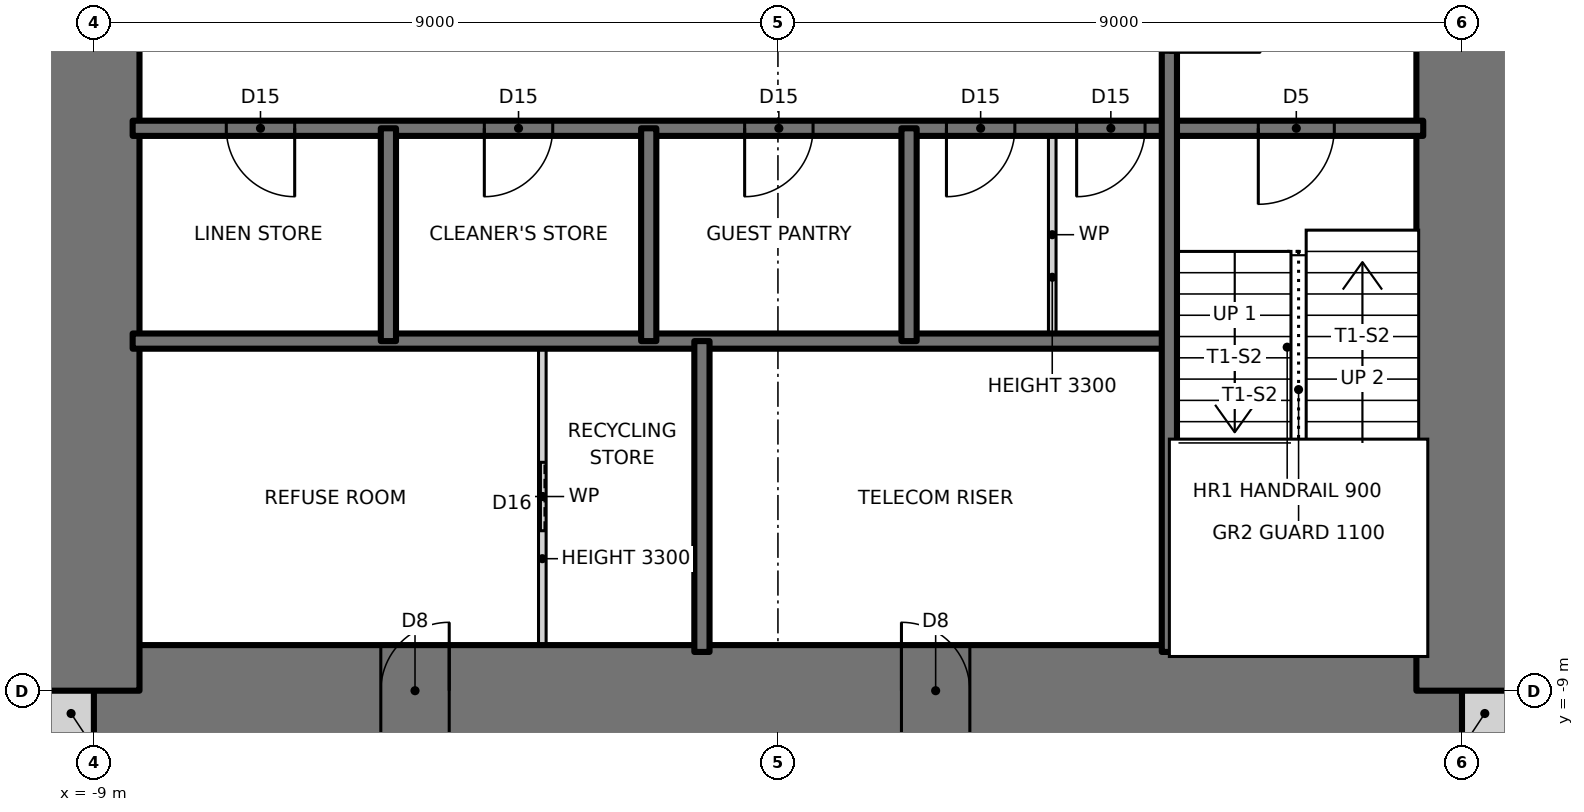
"""IFC4 building model, lengths in metres.
Left out: names, types, materials, properties, quantities, classifications, styles, units other than length and angle.
Written with IfcOpenShell. Run it as: python <this file> out.ifc"""

import sys

from ifc_helpers import new_model, si_unit, direction, frame, frame_2d, origin, place, context, subcontext, project, spatial, rectangle, extrude, element, fill, save


model = new_model("IFC4")
c1 = context("Model", 3, precision=1e-05, world=origin(), true_north=direction((0.0, 1.0)))
c2 = subcontext(c1, "Body", "Model", "MODEL_VIEW")
j1 = project(units=[si_unit("LENGTHUNIT", "METRE"), si_unit("PLANEANGLEUNIT", "RADIAN")], contexts=[c1])
p1 = place(None, origin())
s1 = spatial("IfcSite", under=j1, at=p1, CompositionType="ELEMENT")
p2 = place(p1, origin())
s2 = spatial("IfcBuilding", under=s1, at=p2, CompositionType="ELEMENT")
p3 = place(p2, frame((0.0, 0.0, 184.5)))
s3 = spatial("IfcBuildingStorey", under=s2, at=p3, CompositionType="ELEMENT", Elevation=184.5)
for number, where, z_axis, x_axis in (
    (1, (-9.6, -9.3, 0.0), (0.0, 0.0, 1.0), (1.0, 0.0, 0.0)),
    (2, (9.0, -9.3, 0.0), (0.0, 0.0, 1.0), (1.0, 0.0, 0.0)),
):
    element("IfcWall", number, at=place(p3, frame(where, z_axis=z_axis, x_axis=x_axis)), inside=s3, PredefinedType="SOLIDWALL", context=c2, shape_type="SweptSolid", body=[
        extrude(rectangle(XDim=0.6, YDim=0.6, at=frame_2d((0.3, 0.0))), origin(), (0.0, 0.0, 1.0), 3.5),
    ])
p4 = place(p3, frame((-9.0, -9.0, 0.0), z_axis=(0.0, 0.0, 1.0), x_axis=(1.0, 0.0, 0.0)))
e3 = element("IfcWall", 3, at=p4, inside=s3, PredefinedType="SHEAR", context=c2, shape_type="SweptSolid", body=[
    extrude(rectangle(XDim=18.0, YDim=1.2, at=frame_2d((9.0, 0.0))), origin(), (0.0, 0.0, 1.0), 3.5),
])
p5 = place(p4, frame((3.775, 0.0, 0.0)))
e4 = element("IfcOpeningElement", 4, at=p5, cuts=e3, PredefinedType="OPENING", context=c2, shape_type="SweptSolid", body=[
    extrude(rectangle(XDim=0.9, YDim=2.1, at=frame_2d((0.45, 1.05))), frame((0.0, 0.61, 0.0), z_axis=(0.0, -1.0, 0.0), x_axis=(1.0, 0.0, 0.0)), (0.0, 0.0, 1.0), 1.22),
])
p6 = place(p4, frame((10.625, 0.0, 0.0)))
e5 = element("IfcOpeningElement", 5, at=p6, cuts=e3, PredefinedType="OPENING", context=c2, shape_type="SweptSolid", body=[
    extrude(rectangle(XDim=0.9, YDim=2.1, at=frame_2d((0.45, 1.05))), frame((0.0, 0.61, 0.0), z_axis=(0.0, -1.0, 0.0), x_axis=(1.0, 0.0, 0.0)), (0.0, 0.0, 1.0), 1.22),
])
p7 = place(p3, frame((9.0, -9.0, 0.0), z_axis=(0.0, 0.0, 1.0), x_axis=(0.0, 1.0, 0.0)))
e6 = element("IfcWall", 6, at=p7, inside=s3, PredefinedType="SHEAR", context=c2, shape_type="SweptSolid", body=[
    extrude(rectangle(XDim=18.0, YDim=1.2, at=frame_2d((9.0, 0.0))), origin(), (0.0, 0.0, 1.0), 3.5),
])
p8 = place(p7, frame((8.5, 0.0, 0.0)))
e7 = element("IfcOpeningElement", 7, at=p8, cuts=e6, PredefinedType="OPENING", context=c2, shape_type="SweptSolid", body=[
    extrude(rectangle(XDim=1.0, YDim=2.1, at=frame_2d((0.5, 1.05))), frame((0.0, 0.61, 0.0), z_axis=(0.0, -1.0, 0.0), x_axis=(1.0, 0.0, 0.0)), (0.0, 0.0, 1.0), 1.22),
])
p9 = place(p3, frame((-9.0, 9.0, 0.0), z_axis=(0.0, 0.0, 1.0), x_axis=(0.0, -1.0, 0.0)))
e8 = element("IfcWall", 8, at=p9, inside=s3, PredefinedType="SHEAR", context=c2, shape_type="SweptSolid", body=[
    extrude(rectangle(XDim=18.0, YDim=1.2, at=frame_2d((9.0, 0.0))), origin(), (0.0, 0.0, 1.0), 3.5),
])
p10 = place(p9, frame((8.5, 0.0, 0.0)))
e9 = element("IfcOpeningElement", 9, at=p10, cuts=e8, PredefinedType="OPENING", context=c2, shape_type="SweptSolid", body=[
    extrude(rectangle(XDim=1.0, YDim=2.1, at=frame_2d((0.5, 1.05))), frame((0.0, 0.61, 0.0), z_axis=(0.0, -1.0, 0.0), x_axis=(1.0, 0.0, 0.0)), (0.0, 0.0, 1.0), 1.22),
])
p11 = place(p3, frame((-8.49, -4.4, 0.0), z_axis=(0.0, 0.0, 1.0), x_axis=(1.0, 0.0, 0.0)))
e10 = element("IfcWall", 10, at=p11, inside=s3, PredefinedType="SOLIDWALL", context=c2, shape_type="SweptSolid", body=[
    extrude(rectangle(XDim=13.64, YDim=0.2, at=frame_2d((6.82, 0.0))), origin(), (0.0, 0.0, 1.0), 3.5),
])
p12 = place(p3, frame((-8.49, -1.6, 0.0), z_axis=(0.0, 0.0, 1.0), x_axis=(1.0, 0.0, 0.0)))
e11 = element("IfcWall", 11, at=p12, inside=s3, PredefinedType="SOLIDWALL", context=c2, shape_type="SweptSolid", body=[
    extrude(rectangle(XDim=16.98, YDim=0.2, at=frame_2d((8.49, 0.0))), origin(), (0.0, 0.0, 1.0), 3.5),
])
p13 = place(p12, frame((14.81, 0.0, 0.0)))
e12 = element("IfcOpeningElement", 12, at=p13, cuts=e11, PredefinedType="OPENING", context=c2, shape_type="SweptSolid", body=[
    extrude(rectangle(XDim=1.0, YDim=2.1, at=frame_2d((0.5, 1.05))), frame((0.0, 0.11, 0.0), z_axis=(0.0, -1.0, 0.0), x_axis=(1.0, 0.0, 0.0)), (0.0, 0.0, 1.0), 0.22),
])
p14 = place(p12, frame((1.232, 0.0, 0.0)))
e13 = element("IfcOpeningElement", 13, at=p14, cuts=e11, PredefinedType="OPENING", context=c2, shape_type="SweptSolid", body=[
    extrude(rectangle(XDim=0.9, YDim=2.1, at=frame_2d((0.45, 1.05))), frame((0.0, 0.11, 0.0), z_axis=(0.0, -1.0, 0.0), x_axis=(1.0, 0.0, 0.0)), (0.0, 0.0, 1.0), 0.22),
])
p15 = place(p12, frame((4.627, 0.0, 0.0)))
e14 = element("IfcOpeningElement", 14, at=p15, cuts=e11, PredefinedType="OPENING", context=c2, shape_type="SweptSolid", body=[
    extrude(rectangle(XDim=0.9, YDim=2.1, at=frame_2d((0.45, 1.05))), frame((0.0, 0.11, 0.0), z_axis=(0.0, -1.0, 0.0), x_axis=(1.0, 0.0, 0.0)), (0.0, 0.0, 1.0), 0.22),
])
p16 = place(p12, frame((8.052, 0.0, 0.0)))
e15 = element("IfcOpeningElement", 15, at=p16, cuts=e11, PredefinedType="OPENING", context=c2, shape_type="SweptSolid", body=[
    extrude(rectangle(XDim=0.9, YDim=2.1, at=frame_2d((0.45, 1.05))), frame((0.0, 0.11, 0.0), z_axis=(0.0, -1.0, 0.0), x_axis=(1.0, 0.0, 0.0)), (0.0, 0.0, 1.0), 0.22),
])
p17 = place(p12, frame((12.42, 0.0, 0.0)))
e16 = element("IfcOpeningElement", 16, at=p17, cuts=e11, PredefinedType="OPENING", context=c2, shape_type="SweptSolid", body=[
    extrude(rectangle(XDim=0.9, YDim=2.1, at=frame_2d((0.45, 1.05))), frame((0.0, 0.11, 0.0), z_axis=(0.0, -1.0, 0.0), x_axis=(1.0, 0.0, 0.0)), (0.0, 0.0, 1.0), 0.22),
])
p18 = place(p12, frame((10.707, 0.0, 0.0)))
e17 = element("IfcOpeningElement", 17, at=p18, cuts=e11, PredefinedType="OPENING", context=c2, shape_type="SweptSolid", body=[
    extrude(rectangle(XDim=0.9, YDim=2.1, at=frame_2d((0.45, 1.05))), frame((0.0, 0.11, 0.0), z_axis=(0.0, -1.0, 0.0), x_axis=(1.0, 0.0, 0.0)), (0.0, 0.0, 1.0), 0.22),
])
p19 = place(p3, frame((5.15, -8.49, 0.0), z_axis=(0.0, 0.0, 1.0), x_axis=(0.0, 1.0, 0.0)))
e18 = element("IfcWall", 18, at=p19, inside=s3, PredefinedType="SOLIDWALL", context=c2, shape_type="SweptSolid", body=[
    extrude(rectangle(XDim=13.09, YDim=0.2, at=frame_2d((6.545, 0.0))), origin(), (0.0, 0.0, 1.0), 3.5),
])
p20 = place(p19, frame((7.89, 0.0, 0.0)))
e19 = element("IfcOpeningElement", 19, at=p20, cuts=e18, PredefinedType="OPENING", context=c2, shape_type="SweptSolid", body=[
    extrude(rectangle(XDim=1.2, YDim=2.1, at=frame_2d((0.6, 1.05))), frame((0.0, 0.11, 0.0), z_axis=(0.0, -1.0, 0.0), x_axis=(1.0, 0.0, 0.0)), (0.0, 0.0, 1.0), 0.22),
])
p21 = place(p3, frame((3.609, -4.4, 0.0), z_axis=(0.0, 0.0, 1.0), x_axis=(0.0, 1.0, 0.0)))
e20 = element("IfcWall", 20, at=p21, inside=s3, PredefinedType="PARTITIONING", context=c2, shape_type="SweptSolid", body=[
    extrude(rectangle(XDim=2.8, YDim=0.1, at=frame_2d((1.4, 0.0))), origin(), (0.0, 0.0, 1.0), 3.3),
])
p22 = place(p3, frame((1.725, -4.4, 0.0), z_axis=(0.0, 0.0, 1.0), x_axis=(0.0, 1.0, 0.0)))
e21 = element("IfcWall", 21, at=p22, inside=s3, PredefinedType="SOLIDWALL", context=c2, shape_type="SweptSolid", body=[
    extrude(rectangle(XDim=2.8, YDim=0.2, at=frame_2d((1.4, 0.0))), origin(), (0.0, 0.0, 1.0), 3.5),
])
p23 = place(p3, frame((-1.0, -8.49, 0.0), z_axis=(0.0, 0.0, 1.0), x_axis=(0.0, 1.0, 0.0)))
e22 = element("IfcWall", 22, at=p23, inside=s3, PredefinedType="SOLIDWALL", context=c2, shape_type="SweptSolid", body=[
    extrude(rectangle(XDim=4.09, YDim=0.2, at=frame_2d((2.045, 0.0))), origin(), (0.0, 0.0, 1.0), 3.5),
])
p24 = place(p3, frame((-1.7, -4.4, 0.0), z_axis=(0.0, 0.0, 1.0), x_axis=(0.0, 1.0, 0.0)))
e23 = element("IfcWall", 23, at=p24, inside=s3, PredefinedType="SOLIDWALL", context=c2, shape_type="SweptSolid", body=[
    extrude(rectangle(XDim=2.8, YDim=0.2, at=frame_2d((1.4, 0.0))), origin(), (0.0, 0.0, 1.0), 3.5),
])
p25 = place(p3, frame((-3.1, -8.49, 0.0), z_axis=(0.0, 0.0, 1.0), x_axis=(0.0, 1.0, 0.0)))
e24 = element("IfcWall", 24, at=p25, inside=s3, PredefinedType="PARTITIONING", context=c2, shape_type="SweptSolid", body=[
    extrude(rectangle(XDim=4.09, YDim=0.1, at=frame_2d((2.045, 0.0))), origin(), (0.0, 0.0, 1.0), 3.3),
])
p26 = place(p25, frame((1.595, 0.0, 0.0)))
e25 = element("IfcOpeningElement", 25, at=p26, cuts=e24, PredefinedType="OPENING", context=c2, shape_type="SweptSolid", body=[
    extrude(rectangle(XDim=0.9, YDim=2.1, at=frame_2d((0.45, 1.05))), frame((0.0, 0.06, 0.0), z_axis=(0.0, -1.0, 0.0), x_axis=(1.0, 0.0, 0.0)), (0.0, 0.0, 1.0), 0.12),
])
p27 = place(p3, frame((-5.125, -4.4, 0.0), z_axis=(0.0, 0.0, 1.0), x_axis=(0.0, 1.0, 0.0)))
e26 = element("IfcWall", 26, at=p27, inside=s3, PredefinedType="SOLIDWALL", context=c2, shape_type="SweptSolid", body=[
    extrude(rectangle(XDim=2.8, YDim=0.2, at=frame_2d((1.4, 0.0))), origin(), (0.0, 0.0, 1.0), 3.5),
])
p28 = place(p13, frame((1.0, 0.0, 0.0), z_axis=(0.0, 0.0, 1.0), x_axis=(-1.0, 0.0, 0.0)))
e27 = element("IfcDoor", 27, at=p28, inside=s3, OperationType="SINGLE_SWING_RIGHT", PredefinedType="DOOR", context=c2, shape_type="SweptSolid", body=[
    extrude(rectangle(XDim=1.0, YDim=2.1, at=frame_2d((0.5, 1.05))), frame((0.0, 0.025, 0.0), z_axis=(0.0, -1.0, 0.0), x_axis=(1.0, 0.0, 0.0)), (0.0, 0.0, 1.0), 0.05),
])
fill(e12, e27)
p29 = place(p20, frame((1.2, 0.0, 0.0), z_axis=(0.0, 0.0, 1.0), x_axis=(-1.0, 0.0, 0.0)))
e28 = element("IfcDoor", 28, at=p29, inside=s3, OperationType="SINGLE_SWING_RIGHT", PredefinedType="DOOR", context=c2, shape_type="SweptSolid", body=[
    extrude(rectangle(XDim=1.2, YDim=2.1, at=frame_2d((0.6, 1.05))), frame((0.0, 0.025, 0.0), z_axis=(0.0, -1.0, 0.0), x_axis=(1.0, 0.0, 0.0)), (0.0, 0.0, 1.0), 0.05),
])
fill(e19, e28)
p30 = place(p14, frame((0.9, 0.0, 0.0), z_axis=(0.0, 0.0, 1.0), x_axis=(-1.0, 0.0, 0.0)))
e29 = element("IfcDoor", 29, at=p30, inside=s3, OperationType="SINGLE_SWING_LEFT", PredefinedType="DOOR", context=c2, shape_type="SweptSolid", body=[
    extrude(rectangle(XDim=0.9, YDim=2.1, at=frame_2d((0.45, 1.05))), frame((0.0, 0.025, 0.0), z_axis=(0.0, -1.0, 0.0), x_axis=(1.0, 0.0, 0.0)), (0.0, 0.0, 1.0), 0.05),
])
fill(e13, e29)
p31 = place(p15, frame((0.9, 0.0, 0.0), z_axis=(0.0, 0.0, 1.0), x_axis=(-1.0, 0.0, 0.0)))
e30 = element("IfcDoor", 30, at=p31, inside=s3, OperationType="SINGLE_SWING_RIGHT", PredefinedType="DOOR", context=c2, shape_type="SweptSolid", body=[
    extrude(rectangle(XDim=0.9, YDim=2.1, at=frame_2d((0.45, 1.05))), frame((0.0, 0.025, 0.0), z_axis=(0.0, -1.0, 0.0), x_axis=(1.0, 0.0, 0.0)), (0.0, 0.0, 1.0), 0.05),
])
fill(e14, e30)
p32 = place(p16, frame((0.9, 0.0, 0.0), z_axis=(0.0, 0.0, 1.0), x_axis=(-1.0, 0.0, 0.0)))
e31 = element("IfcDoor", 31, at=p32, inside=s3, OperationType="SINGLE_SWING_RIGHT", PredefinedType="DOOR", context=c2, shape_type="SweptSolid", body=[
    extrude(rectangle(XDim=0.9, YDim=2.1, at=frame_2d((0.45, 1.05))), frame((0.0, 0.025, 0.0), z_axis=(0.0, -1.0, 0.0), x_axis=(1.0, 0.0, 0.0)), (0.0, 0.0, 1.0), 0.05),
])
fill(e15, e31)
p33 = place(p17, frame((0.9, 0.0, 0.0), z_axis=(0.0, 0.0, 1.0), x_axis=(-1.0, 0.0, 0.0)))
e32 = element("IfcDoor", 32, at=p33, inside=s3, OperationType="SINGLE_SWING_RIGHT", PredefinedType="DOOR", context=c2, shape_type="SweptSolid", body=[
    extrude(rectangle(XDim=0.9, YDim=2.1, at=frame_2d((0.45, 1.05))), frame((0.0, 0.025, 0.0), z_axis=(0.0, -1.0, 0.0), x_axis=(1.0, 0.0, 0.0)), (0.0, 0.0, 1.0), 0.05),
])
fill(e16, e32)
p34 = place(p18, frame((0.9, 0.0, 0.0), z_axis=(0.0, 0.0, 1.0), x_axis=(-1.0, 0.0, 0.0)))
e33 = element("IfcDoor", 33, at=p34, inside=s3, OperationType="SINGLE_SWING_RIGHT", PredefinedType="DOOR", context=c2, shape_type="SweptSolid", body=[
    extrude(rectangle(XDim=0.9, YDim=2.1, at=frame_2d((0.45, 1.05))), frame((0.0, 0.025, 0.0), z_axis=(0.0, -1.0, 0.0), x_axis=(1.0, 0.0, 0.0)), (0.0, 0.0, 1.0), 0.05),
])
fill(e17, e33)
p35 = place(p26, origin())
e34 = element("IfcDoor", 34, at=p35, inside=s3, OperationType="SLIDING_TO_LEFT", PredefinedType="DOOR", context=c2, shape_type="SweptSolid", body=[
    extrude(rectangle(XDim=0.9, YDim=2.1, at=frame_2d((0.45, 1.05))), frame((0.0, 0.025, 0.0), z_axis=(0.0, -1.0, 0.0), x_axis=(1.0, 0.0, 0.0)), (0.0, 0.0, 1.0), 0.05),
])
fill(e25, e34)
p36 = place(p5, origin())
e35 = element("IfcDoor", 35, at=p36, inside=s3, OperationType="SINGLE_SWING_RIGHT", PredefinedType="DOOR", context=c2, shape_type="SweptSolid", body=[
    extrude(rectangle(XDim=0.9, YDim=2.1, at=frame_2d((0.45, 1.05))), frame((0.0, 0.025, 0.0), z_axis=(0.0, -1.0, 0.0), x_axis=(1.0, 0.0, 0.0)), (0.0, 0.0, 1.0), 0.05),
])
fill(e4, e35)
p37 = place(p6, origin())
e36 = element("IfcDoor", 36, at=p37, inside=s3, OperationType="SINGLE_SWING_LEFT", PredefinedType="DOOR", context=c2, shape_type="SweptSolid", body=[
    extrude(rectangle(XDim=0.9, YDim=2.1, at=frame_2d((0.45, 1.05))), frame((0.0, 0.025, 0.0), z_axis=(0.0, -1.0, 0.0), x_axis=(1.0, 0.0, 0.0)), (0.0, 0.0, 1.0), 0.05),
])
fill(e5, e36)
save(model, sys.argv[1])
